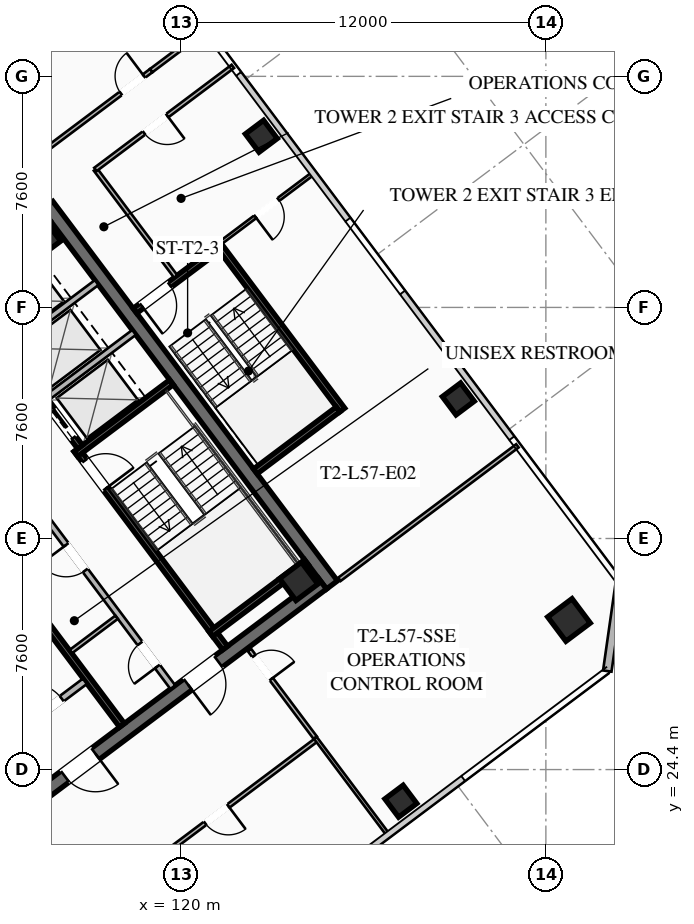
"""IFC4 building model, lengths in metres.
Left out: names, types, materials, properties, quantities, classifications, styles, units other than length and angle.
Written with IfcOpenShell. Run it as: python <this file> out.ifc"""

import sys

from ifc_helpers import new_model, si_unit, direction, frame, frame_2d, origin, origin_2d, place, context, subcontext, project, spatial, rectangle, hollow_rectangle, extrude, element, fill, save


model = new_model("IFC4")
c1 = context("Model", 3, precision=1e-05, world=origin(), true_north=direction((0.0, 1.0)))
c2 = subcontext(c1, "Body", "Model", "MODEL_VIEW")
j1 = project(units=[si_unit("LENGTHUNIT", "METRE"), si_unit("PLANEANGLEUNIT", "RADIAN")], contexts=[c1])
p1 = place(None, origin())
s1 = spatial("IfcSite", under=j1, at=p1, CompositionType="ELEMENT")
p2 = place(p1, origin())
s2 = spatial("IfcBuilding", under=s1, at=p2, CompositionType="ELEMENT")
p3 = place(p2, frame((0.0, 0.0, 211.3)))
s3 = spatial("IfcBuildingStorey", under=s2, at=p3, CompositionType="ELEMENT", Elevation=211.3)
p4 = place(p3, frame((115.604, 42.953, 0.0), z_axis=(0.0, 0.0, 1.0), x_axis=(0.600005007985, -0.799996243986, 0.0)))
e1 = element("IfcWall", 1, at=p4, inside=s3, PredefinedType="SHEAR", context=c2, shape_type="SweptSolid", body=[
    extrude(rectangle(XDim=15.6, YDim=0.45, at=frame_2d((7.8, 0.0))), origin(), (0.0, 0.0, 1.0), 3.55),
])
p5 = place(p3, frame((124.649, 30.518, 0.0), z_axis=(0.0, 0.0, 1.0), x_axis=(-0.8, -0.6, 0.0)))
e2 = element("IfcWall", 2, at=p5, inside=s3, PredefinedType="SHEAR", context=c2, shape_type="SweptSolid", body=[
    extrude(rectangle(XDim=15.26, YDim=0.45, at=frame_2d((7.63, 0.0))), origin(), (0.0, 0.0, 1.0), 3.55),
])
p6 = place(p5, frame((9.33, 0.0, 0.0)))
e3 = element("IfcOpeningElement", 3, at=p6, cuts=e2, PredefinedType="OPENING", context=c2, shape_type="SweptSolid", body=[
    extrude(rectangle(XDim=1.25, YDim=2.25, at=frame_2d((0.625, 1.125))), frame((0.0, 0.235, 0.0), z_axis=(0.0, -1.0, 0.0), x_axis=(1.0, 0.0, 0.0)), (0.0, 0.0, 1.0), 0.47),
])
p7 = place(p5, frame((4.28, 0.0, 0.0)))
e4 = element("IfcOpeningElement", 4, at=p7, cuts=e2, PredefinedType="OPENING", context=c2, shape_type="SweptSolid", body=[
    extrude(rectangle(XDim=1.25, YDim=2.25, at=frame_2d((0.625, 1.125))), frame((0.0, 0.235, 0.0), z_axis=(0.0, -1.0, 0.0), x_axis=(1.0, 0.0, 0.0)), (0.0, 0.0, 1.0), 0.47),
])
for number, where, z_axis, x_axis in (
    (5, (123.87, 30.59, 0.0), (0.0, 0.0, 1.0), (0.8, 0.6, 0.0)),
    (6, (115.41, 41.87, 0.0), (0.0, 0.0, 1.0), (0.8, 0.6, 0.0)),
):
    element("IfcColumn", number, at=place(p3, frame(where, z_axis=z_axis, x_axis=x_axis)), inside=s3, PredefinedType="COLUMN", context=c2, shape_type="SweptSolid", body=[
        extrude(hollow_rectangle(XDim=0.9, YDim=0.9, WallThickness=0.04, at=origin_2d()), origin(), (0.0, 0.0, 1.0), 3.37),
    ])
p8 = place(p3, frame((132.76, 29.32, 0.0), z_axis=(0.0, 0.0, 1.0), x_axis=(0.799999996291, 0.600000004945, 0.0)))
e7 = element("IfcColumn", 7, at=p8, inside=s3, PredefinedType="COLUMN", context=c2, shape_type="SweptSolid", body=[
    extrude(hollow_rectangle(XDim=1.0, YDim=1.0, WallThickness=0.04, at=origin_2d()), origin(), (0.0, 0.0, 1.0), 3.37),
])
for number, where, z_axis, x_axis in (
    (8, (127.23, 23.36, 0.0), (0.0, 0.0, 1.0), (0.8, 0.6, 0.0)),
    (9, (129.12, 36.59, 0.0), (0.0, 0.0, 1.0), (0.8, 0.6, 0.0)),
    (10, (122.64, 45.23, 0.0), (0.0, 0.0, 1.0), (0.8, 0.6, 0.0)),
):
    element("IfcColumn", number, at=place(p3, frame(where, z_axis=z_axis, x_axis=x_axis)), inside=s3, PredefinedType="COLUMN", context=c2, shape_type="SweptSolid", body=[
        extrude(hollow_rectangle(XDim=0.75, YDim=0.75, WallThickness=0.032, at=origin_2d()), origin(), (0.0, 0.0, 1.0), 3.37),
    ])
p9 = place(p3, frame((134.44, 30.58, 0.0), z_axis=(0.0, 0.0, 1.0), x_axis=(-0.14138683146, -0.989954425158, 0.0)))
e11 = element("IfcWall", 11, at=p9, inside=s3, PredefinedType="SOLIDWALL", context=c2, shape_type="SweptSolid", body=[
    extrude(rectangle(XDim=2.97, YDim=0.28, at=frame_2d((1.485, 0.0))), origin(), (0.0, 0.0, 1.0), 3.37),
])
p10 = place(p3, frame((116.56, 34.92, 0.0), z_axis=(0.0, 0.0, 1.0), x_axis=(0.59999041401, -0.800007189403, 0.0)))
e12 = element("IfcWall", 12, at=p10, inside=s3, PredefinedType="SHEAR", context=c2, shape_type="SweptSolid", body=[
    extrude(rectangle(XDim=8.15, YDim=0.2, at=frame_2d((4.075, 0.0))), origin(), (0.0, 0.0, 1.0), 3.37),
])
p11 = place(p10, frame((0.45, 0.0, 0.0)))
e13 = element("IfcOpeningElement", 13, at=p11, cuts=e12, PredefinedType="OPENING", context=c2, shape_type="SweptSolid", body=[
    extrude(rectangle(XDim=1.15, YDim=2.2, at=frame_2d((0.575, 1.1))), frame((0.0, 0.11, 0.0), z_axis=(0.0, -1.0, 0.0), x_axis=(1.0, 0.0, 0.0)), (0.0, 0.0, 1.0), 0.22),
])
for number, where, z_axis, x_axis in (
    (14, (116.54, 34.78, 0.0), (0.0, 0.0, 1.0), (0.8, 0.6, 0.0)),
    (15, (120.98, 28.86, 0.0), (0.0, 0.0, 1.0), (0.8, 0.6, 0.0)),
):
    element("IfcWall", number, at=place(p3, frame(where, z_axis=z_axis, x_axis=x_axis)), inside=s3, PredefinedType="SHEAR", context=c2, shape_type="SweptSolid", body=[
        extrude(rectangle(XDim=3.93, YDim=0.2, at=frame_2d((1.965, 0.0))), origin(), (0.0, 0.0, 1.0), 3.37),
    ])
p12 = place(p3, frame((118.058, 25.856, 0.0), z_axis=(0.0, 0.0, 1.0), x_axis=(-0.600002657301, 0.799998007018, 0.0)))
e16 = element("IfcWall", 16, at=p12, inside=s3, PredefinedType="SHEAR", context=c2, shape_type="SweptSolid", body=[
    extrude(rectangle(XDim=14.7, YDim=0.2, at=frame_2d((7.35, 0.0))), origin(), (0.0, 0.0, 1.0), 3.37),
])
p13 = place(p3, frame((114.316, 25.412, 0.0), z_axis=(0.0, 0.0, 1.0), x_axis=(0.800018601094, 0.59997519774, 0.0)))
e17 = element("IfcWall", 17, at=p13, inside=s3, PredefinedType="SOLIDWALL", context=c2, shape_type="SweptSolid", body=[
    extrude(rectangle(XDim=3.15, YDim=0.22, at=frame_2d((1.575, 0.0))), origin(), (0.0, 0.0, 1.0), 2.723),
])
p14 = place(p13, frame((0.95, 0.0, 0.0)))
e18 = element("IfcOpeningElement", 18, at=p14, cuts=e17, PredefinedType="OPENING", context=c2, shape_type="SweptSolid", body=[
    extrude(rectangle(XDim=1.25, YDim=2.25, at=frame_2d((0.625, 1.125))), frame((0.0, 0.12, 0.0), z_axis=(0.0, -1.0, 0.0), x_axis=(1.0, 0.0, 0.0)), (0.0, 0.0, 1.0), 0.24),
])
p15 = place(p3, frame((112.75, 40.25, 0.0), z_axis=(0.0, 0.0, 1.0), x_axis=(0.599994036198, -0.800004472816, 0.0)))
e19 = element("IfcWall", 19, at=p15, inside=s3, PredefinedType="SHEAR", context=c2, shape_type="SweptSolid", body=[
    extrude(rectangle(XDim=6.55, YDim=0.2, at=frame_2d((3.275, 0.0))), origin(), (0.0, 0.0, 1.0), 3.37),
])
p16 = place(p15, frame((5.075, 0.0, 0.0)))
e20 = element("IfcOpeningElement", 20, at=p16, cuts=e19, PredefinedType="OPENING", context=c2, shape_type="SweptSolid", body=[
    extrude(rectangle(XDim=1.1, YDim=2.2, at=frame_2d((0.55, 1.1))), frame((0.0, 0.11, 0.0), z_axis=(0.0, -1.0, 0.0), x_axis=(1.0, 0.0, 0.0)), (0.0, 0.0, 1.0), 0.22),
])
p17 = place(p15, frame((3.025, 0.0, 0.0)))
e21 = element("IfcOpeningElement", 21, at=p17, cuts=e19, PredefinedType="OPENING", context=c2, shape_type="SweptSolid", body=[
    extrude(rectangle(XDim=1.1, YDim=2.2, at=frame_2d((0.55, 1.1))), frame((0.0, 0.11, 0.0), z_axis=(0.0, -1.0, 0.0), x_axis=(1.0, 0.0, 0.0)), (0.0, 0.0, 1.0), 0.22),
])
p18 = place(p15, frame((1.025, 0.0, 0.0)))
e22 = element("IfcOpeningElement", 22, at=p18, cuts=e19, PredefinedType="OPENING", context=c2, shape_type="SweptSolid", body=[
    extrude(rectangle(XDim=1.1, YDim=2.2, at=frame_2d((0.55, 1.1))), frame((0.0, 0.11, 0.0), z_axis=(0.0, -1.0, 0.0), x_axis=(1.0, 0.0, 0.0)), (0.0, 0.0, 1.0), 0.22),
])
for number, where, z_axis, x_axis in (
    (23, (115.59, 36.63, 0.0), (0.0, 0.0, 1.0), (0.8, 0.6, 0.0)),
    (24, (114.36, 38.27, 0.0), (0.0, 0.0, 1.0), (0.8, 0.6, 0.0)),
):
    element("IfcWall", number, at=place(p3, frame(where, z_axis=z_axis, x_axis=x_axis)), inside=s3, PredefinedType="SOLIDWALL", context=c2, shape_type="SweptSolid", body=[
        extrude(rectangle(XDim=3.58, YDim=0.2, at=frame_2d((1.79, 0.0))), origin(), (0.0, 0.0, 1.0), 3.37),
    ])
p19 = place(p3, frame((119.73, 27.11, 0.0), z_axis=(0.0, 0.0, 1.0), x_axis=(-0.600005580459, 0.799995814625, 0.0)))
e25 = element("IfcWall", 25, at=p19, inside=s3, PredefinedType="SOLIDWALL", context=c2, shape_type="SweptSolid", body=[
    extrude(rectangle(XDim=7.0, YDim=0.2, at=frame_2d((3.5, 0.0))), origin(), (0.0, 0.0, 1.0), 2.723),
])
p20 = place(p19, frame((0.85, 0.0, 0.0)))
e26 = element("IfcOpeningElement", 26, at=p20, cuts=e25, PredefinedType="OPENING", context=c2, shape_type="SweptSolid", body=[
    extrude(rectangle(XDim=0.95, YDim=2.05, at=frame_2d((0.475, 1.025))), frame((0.0, 0.11, 0.0), z_axis=(0.0, -1.0, 0.0), x_axis=(1.0, 0.0, 0.0)), (0.0, 0.0, 1.0), 0.22),
])
p21 = place(p19, frame((4.8, 0.0, 0.0)))
e27 = element("IfcOpeningElement", 27, at=p21, cuts=e25, PredefinedType="OPENING", context=c2, shape_type="SweptSolid", body=[
    extrude(rectangle(XDim=1.05, YDim=2.2, at=frame_2d((0.525, 1.1))), frame((0.0, 0.11, 0.0), z_axis=(0.0, -1.0, 0.0), x_axis=(1.0, 0.0, 0.0)), (0.0, 0.0, 1.0), 0.22),
])
p22 = place(p3, frame((116.376, 28.282, 0.0), z_axis=(0.0, 0.0, 1.0), x_axis=(0.8, 0.6, 0.0)))
e28 = element("IfcWall", 28, at=p22, inside=s3, PredefinedType="PARTITIONING", context=c2, shape_type="SweptSolid", body=[
    extrude(rectangle(XDim=1.88, YDim=0.135, at=frame_2d((0.94, 0.0))), origin(), (0.0, 0.0, 1.0), 2.723),
])
p23 = place(p3, frame((125.304, 36.228, 0.0), z_axis=(0.0, 0.0, 1.0), x_axis=(-0.59998851072, 0.800008616831, 0.0)))
e29 = element("IfcWall", 29, at=p23, inside=s3, PredefinedType="SHEAR", context=c2, shape_type="SweptSolid", body=[
    extrude(rectangle(XDim=6.8, YDim=0.2, at=frame_2d((3.4, 0.0))), origin(), (0.0, 0.0, 1.0), 3.37),
])
p24 = place(p3, frame((121.204, 41.528, 0.0), z_axis=(0.0, 0.0, 1.0), x_axis=(-0.800017232136, -0.599977023131, 0.0)))
e30 = element("IfcWall", 30, at=p24, inside=s3, PredefinedType="SHEAR", context=c2, shape_type="SweptSolid", body=[
    extrude(rectangle(XDim=3.4, YDim=0.2, at=frame_2d((1.7, 0.0))), origin(), (0.0, 0.0, 1.0), 3.37),
])
p25 = place(p24, frame((1.975, 0.0, 0.0)))
e31 = element("IfcOpeningElement", 31, at=p25, cuts=e30, PredefinedType="OPENING", context=c2, shape_type="SweptSolid", body=[
    extrude(rectangle(XDim=1.15, YDim=2.2, at=frame_2d((0.575, 1.1))), frame((0.0, 0.11, 0.0), z_axis=(0.0, -1.0, 0.0), x_axis=(1.0, 0.0, 0.0)), (0.0, 0.0, 1.0), 0.22),
])
p26 = place(p3, frame((122.444, 34.208, 0.0), z_axis=(0.0, 0.0, 1.0), x_axis=(0.79999138319, 0.600011488909, 0.0)))
e32 = element("IfcWall", 32, at=p26, inside=s3, PredefinedType="SHEAR", context=c2, shape_type="SweptSolid", body=[
    extrude(rectangle(XDim=3.4, YDim=0.2, at=frame_2d((1.7, 0.0))), origin(), (0.0, 0.0, 1.0), 3.37),
])
p27 = place(p3, frame((119.824, 40.618, 0.0), z_axis=(0.0, 0.0, 1.0), x_axis=(-0.599982243973, 0.800013316712, 0.0)))
e33 = element("IfcWall", 33, at=p27, inside=s3, PredefinedType="PARTITIONING", context=c2, shape_type="SweptSolid", body=[
    extrude(rectangle(XDim=4.4, YDim=0.135, at=frame_2d((2.2, 0.0))), origin(), (0.0, 0.0, 1.0), 2.723),
])
p28 = place(p3, frame((100.756, 33.692, 0.0), z_axis=(0.0, 0.0, 1.0), x_axis=(0.799998716732, 0.60000171102, 0.0)))
e34 = element("IfcWall", 34, at=p28, inside=s3, PredefinedType="PARTITIONING", context=c2, shape_type="SweptSolid", body=[
    extrude(rectangle(XDim=22.83, YDim=0.135, at=frame_2d((11.415, 0.0))), origin(), (0.0, 0.0, 1.0), 2.723),
])
p29 = place(p28, frame((9.38, 0.0, 0.0)))
e35 = element("IfcOpeningElement", 35, at=p29, cuts=e34, PredefinedType="OPENING", context=c2, shape_type="SweptSolid", body=[
    extrude(rectangle(XDim=0.95, YDim=2.05, at=frame_2d((0.475, 1.025))), frame((0.0, 0.077, 0.0), z_axis=(0.0, -1.0, 0.0), x_axis=(1.0, 0.0, 0.0)), (0.0, 0.0, 1.0), 0.155),
])
p30 = place(p28, frame((21.58, 0.0, 0.0)))
e36 = element("IfcOpeningElement", 36, at=p30, cuts=e34, PredefinedType="OPENING", context=c2, shape_type="SweptSolid", body=[
    extrude(rectangle(XDim=0.95, YDim=2.05, at=frame_2d((0.475, 1.025))), frame((0.0, 0.077, 0.0), z_axis=(0.0, -1.0, 0.0), x_axis=(1.0, 0.0, 0.0)), (0.0, 0.0, 1.0), 0.155),
])
p31 = place(p3, frame((119.02, 47.39, 0.0), z_axis=(0.0, 0.0, 1.0), x_axis=(0.799960585956, 0.600052548463, 0.0)))
e37 = element("IfcWall", 37, at=p31, inside=s3, PredefinedType="PARTITIONING", context=c2, shape_type="SweptSolid", body=[
    extrude(rectangle(XDim=2.23, YDim=0.135, at=frame_2d((1.115, 0.0))), origin(), (0.0, 0.0, 1.0), 2.723),
])
p32 = place(p3, frame((124.462, 25.384, 0.0), z_axis=(0.0, 0.0, 1.0), x_axis=(-0.799997904343, -0.6000027942, 0.0)))
e38 = element("IfcWall", 38, at=p32, inside=s3, PredefinedType="PARTITIONING", context=c2, shape_type="SweptSolid", body=[
    extrude(rectangle(XDim=13.98, YDim=0.135, at=frame_2d((6.99, 0.0))), origin(), (0.0, 0.0, 1.0), 2.723),
])
p33 = place(p32, frame((3.635, 0.0, 0.0)))
e39 = element("IfcOpeningElement", 39, at=p33, cuts=e38, PredefinedType="OPENING", context=c2, shape_type="SweptSolid", body=[
    extrude(rectangle(XDim=0.95, YDim=2.05, at=frame_2d((0.475, 1.025))), frame((0.0, 0.077, 0.0), z_axis=(0.0, -1.0, 0.0), x_axis=(1.0, 0.0, 0.0)), (0.0, 0.0, 1.0), 0.155),
])
p34 = place(p3, frame((122.248, 28.336, 0.0), z_axis=(0.0, 0.0, 1.0), x_axis=(0.600010820699, -0.799991884361, 0.0)))
e40 = element("IfcWall", 40, at=p34, inside=s3, PredefinedType="PARTITIONING", context=c2, shape_type="SweptSolid", body=[
    extrude(rectangle(XDim=3.61, YDim=0.135, at=frame_2d((1.805, 0.0))), origin(), (0.0, 0.0, 1.0), 2.723),
])
p35 = place(p34, frame((0.25, 0.0, 0.0)))
e41 = element("IfcOpeningElement", 41, at=p35, cuts=e40, PredefinedType="OPENING", context=c2, shape_type="SweptSolid", body=[
    extrude(rectangle(XDim=0.95, YDim=2.05, at=frame_2d((0.475, 1.025))), frame((0.0, 0.077, 0.0), z_axis=(0.0, -1.0, 0.0), x_axis=(1.0, 0.0, 0.0)), (0.0, 0.0, 1.0), 0.155),
])
p36 = place(p3, frame((126.808, 22.256, 0.0), z_axis=(0.0, 0.0, 1.0), x_axis=(-0.600019580308, 0.799985314394, 0.0)))
e42 = element("IfcWall", 42, at=p36, inside=s3, PredefinedType="PARTITIONING", context=c2, shape_type="SweptSolid", body=[
    extrude(rectangle(XDim=3.99, YDim=0.11, at=frame_2d((1.995, 0.0))), origin(), (0.0, 0.0, 1.0), 2.723),
])
p37 = place(p3, frame((121.704, 47.528, 0.0), z_axis=(0.0, 0.0, 1.0), x_axis=(-0.799989629485, -0.600013827105, 0.0)))
e43 = element("IfcWall", 43, at=p37, inside=s3, PredefinedType="PARTITIONING", context=c2, shape_type="SweptSolid", body=[
    extrude(rectangle(XDim=5.65, YDim=0.135, at=frame_2d((2.825, 0.0))), origin(), (0.0, 0.0, 1.0), 2.723),
])
p38 = place(p37, frame((2.7, 0.0, 0.0)))
e44 = element("IfcOpeningElement", 44, at=p38, cuts=e43, PredefinedType="OPENING", context=c2, shape_type="SweptSolid", body=[
    extrude(rectangle(XDim=0.95, YDim=2.05, at=frame_2d((0.475, 1.025))), frame((0.0, 0.077, 0.0), z_axis=(0.0, -1.0, 0.0), x_axis=(1.0, 0.0, 0.0)), (0.0, 0.0, 1.0), 0.155),
])
p39 = place(p3, frame((125.208, 30.656, 0.0), z_axis=(0.0, 0.0, 1.0), x_axis=(0.79999199534, 0.600010672732, 0.0)))
e45 = element("IfcWall", 45, at=p39, inside=s3, PredefinedType="PARTITIONING", context=c2, shape_type="SweptSolid", body=[
    extrude(rectangle(XDim=7.32, YDim=0.135, at=frame_2d((3.66, 0.0))), origin(), (0.0, 0.0, 1.0), 2.723),
])
p40 = place(p3, frame((124.344, 44.008, 0.0), z_axis=(0.0, 0.0, 1.0), x_axis=(-0.8, -0.6, 0.0)))
e46 = element("IfcWall", 46, at=p40, inside=s3, PredefinedType="PARTITIONING", context=c2, shape_type="SweptSolid", body=[
    extrude(rectangle(XDim=3.8, YDim=0.11, at=frame_2d((1.9, 0.0))), origin(), (0.0, 0.0, 1.0), 2.723),
])
p41 = place(p40, frame((1.425, 0.0, 0.0)))
e47 = element("IfcOpeningElement", 47, at=p41, cuts=e46, PredefinedType="OPENING", context=c2, shape_type="SweptSolid", body=[
    extrude(rectangle(XDim=0.95, YDim=2.05, at=frame_2d((0.475, 1.025))), frame((0.0, 0.065, 0.0), z_axis=(0.0, -1.0, 0.0), x_axis=(1.0, 0.0, 0.0)), (0.0, 0.0, 1.0), 0.13),
])
p42 = place(p6, origin())
e48 = element("IfcDoor", 48, at=p42, inside=s3, OperationType="SINGLE_SWING_LEFT", PredefinedType="DOOR", context=c2, shape_type="SweptSolid", body=[
    extrude(rectangle(XDim=1.25, YDim=2.25, at=frame_2d((0.625, 1.125))), frame((0.0, 0.025, 0.0), z_axis=(0.0, -1.0, 0.0), x_axis=(1.0, 0.0, 0.0)), (0.0, 0.0, 1.0), 0.05),
])
fill(e3, e48)
p43 = place(p7, origin())
e49 = element("IfcDoor", 49, at=p43, inside=s3, OperationType="SINGLE_SWING_RIGHT", PredefinedType="DOOR", context=c2, shape_type="SweptSolid", body=[
    extrude(rectangle(XDim=1.25, YDim=2.25, at=frame_2d((0.625, 1.125))), frame((0.0, 0.025, 0.0), z_axis=(0.0, -1.0, 0.0), x_axis=(1.0, 0.0, 0.0)), (0.0, 0.0, 1.0), 0.05),
])
fill(e4, e49)
p44 = place(p11, origin())
e50 = element("IfcDoor", 50, at=p44, inside=s3, OperationType="SINGLE_SWING_RIGHT", PredefinedType="DOOR", context=c2, shape_type="SweptSolid", body=[
    extrude(rectangle(XDim=1.15, YDim=2.2, at=frame_2d((0.575, 1.1))), frame((0.0, 0.025, 0.0), z_axis=(0.0, -1.0, 0.0), x_axis=(1.0, 0.0, 0.0)), (0.0, 0.0, 1.0), 0.05),
])
fill(e13, e50)
p45 = place(p14, origin())
e51 = element("IfcDoor", 51, at=p45, inside=s3, OperationType="SINGLE_SWING_LEFT", PredefinedType="DOOR", context=c2, shape_type="SweptSolid", body=[
    extrude(rectangle(XDim=1.25, YDim=2.25, at=frame_2d((0.625, 1.125))), frame((0.0, 0.025, 0.0), z_axis=(0.0, -1.0, 0.0), x_axis=(1.0, 0.0, 0.0)), (0.0, 0.0, 1.0), 0.05),
])
fill(e18, e51)
p46 = place(p20, origin())
e52 = element("IfcDoor", 52, at=p46, inside=s3, OperationType="SINGLE_SWING_LEFT", PredefinedType="DOOR", context=c2, shape_type="SweptSolid", body=[
    extrude(rectangle(XDim=0.95, YDim=2.05, at=frame_2d((0.475, 1.025))), frame((0.0, 0.025, 0.0), z_axis=(0.0, -1.0, 0.0), x_axis=(1.0, 0.0, 0.0)), (0.0, 0.0, 1.0), 0.05),
])
fill(e26, e52)
p47 = place(p21, origin())
e53 = element("IfcDoor", 53, at=p47, inside=s3, OperationType="SINGLE_SWING_RIGHT", PredefinedType="DOOR", context=c2, shape_type="SweptSolid", body=[
    extrude(rectangle(XDim=1.05, YDim=2.2, at=frame_2d((0.525, 1.1))), frame((0.0, 0.025, 0.0), z_axis=(0.0, -1.0, 0.0), x_axis=(1.0, 0.0, 0.0)), (0.0, 0.0, 1.0), 0.05),
])
fill(e27, e53)
p48 = place(p25, origin())
e54 = element("IfcDoor", 54, at=p48, inside=s3, OperationType="SINGLE_SWING_RIGHT", PredefinedType="DOOR", context=c2, shape_type="SweptSolid", body=[
    extrude(rectangle(XDim=1.15, YDim=2.2, at=frame_2d((0.575, 1.1))), frame((0.0, 0.025, 0.0), z_axis=(0.0, -1.0, 0.0), x_axis=(1.0, 0.0, 0.0)), (0.0, 0.0, 1.0), 0.05),
])
fill(e31, e54)
p49 = place(p30, origin())
e55 = element("IfcDoor", 55, at=p49, inside=s3, OperationType="SINGLE_SWING_RIGHT", PredefinedType="DOOR", context=c2, shape_type="SweptSolid", body=[
    extrude(rectangle(XDim=0.95, YDim=2.05, at=frame_2d((0.475, 1.025))), frame((0.0, 0.025, 0.0), z_axis=(0.0, -1.0, 0.0), x_axis=(1.0, 0.0, 0.0)), (0.0, 0.0, 1.0), 0.05),
])
fill(e36, e55)
p50 = place(p33, origin())
e56 = element("IfcDoor", 56, at=p50, inside=s3, OperationType="SINGLE_SWING_LEFT", PredefinedType="DOOR", context=c2, shape_type="SweptSolid", body=[
    extrude(rectangle(XDim=0.95, YDim=2.05, at=frame_2d((0.475, 1.025))), frame((0.0, 0.025, 0.0), z_axis=(0.0, -1.0, 0.0), x_axis=(1.0, 0.0, 0.0)), (0.0, 0.0, 1.0), 0.05),
])
fill(e39, e56)
p51 = place(p35, origin())
e57 = element("IfcDoor", 57, at=p51, inside=s3, OperationType="SINGLE_SWING_RIGHT", PredefinedType="DOOR", context=c2, shape_type="SweptSolid", body=[
    extrude(rectangle(XDim=0.95, YDim=2.05, at=frame_2d((0.475, 1.025))), frame((0.0, 0.025, 0.0), z_axis=(0.0, -1.0, 0.0), x_axis=(1.0, 0.0, 0.0)), (0.0, 0.0, 1.0), 0.05),
])
fill(e41, e57)
p52 = place(p38, origin())
e58 = element("IfcDoor", 58, at=p52, inside=s3, OperationType="SINGLE_SWING_LEFT", PredefinedType="DOOR", context=c2, shape_type="SweptSolid", body=[
    extrude(rectangle(XDim=0.95, YDim=2.05, at=frame_2d((0.475, 1.025))), frame((0.0, 0.025, 0.0), z_axis=(0.0, -1.0, 0.0), x_axis=(1.0, 0.0, 0.0)), (0.0, 0.0, 1.0), 0.05),
])
fill(e44, e58)
p53 = place(p41, origin())
e59 = element("IfcDoor", 59, at=p53, inside=s3, OperationType="SINGLE_SWING_RIGHT", PredefinedType="DOOR", context=c2, shape_type="SweptSolid", body=[
    extrude(rectangle(XDim=0.95, YDim=2.05, at=frame_2d((0.475, 1.025))), frame((0.0, 0.025, 0.0), z_axis=(0.0, -1.0, 0.0), x_axis=(1.0, 0.0, 0.0)), (0.0, 0.0, 1.0), 0.05),
])
fill(e47, e59)
p54 = place(p16, origin())
e60 = element("IfcDoor", 60, at=p54, inside=s3, OperationType="SLIDING_TO_LEFT", PredefinedType="DOOR", context=c2, shape_type="SweptSolid", body=[
    extrude(rectangle(XDim=1.1, YDim=2.2, at=frame_2d((0.55, 1.1))), frame((0.0, 0.025, 0.0), z_axis=(0.0, -1.0, 0.0), x_axis=(1.0, 0.0, 0.0)), (0.0, 0.0, 1.0), 0.05),
])
fill(e20, e60)
save(model, sys.argv[1])
